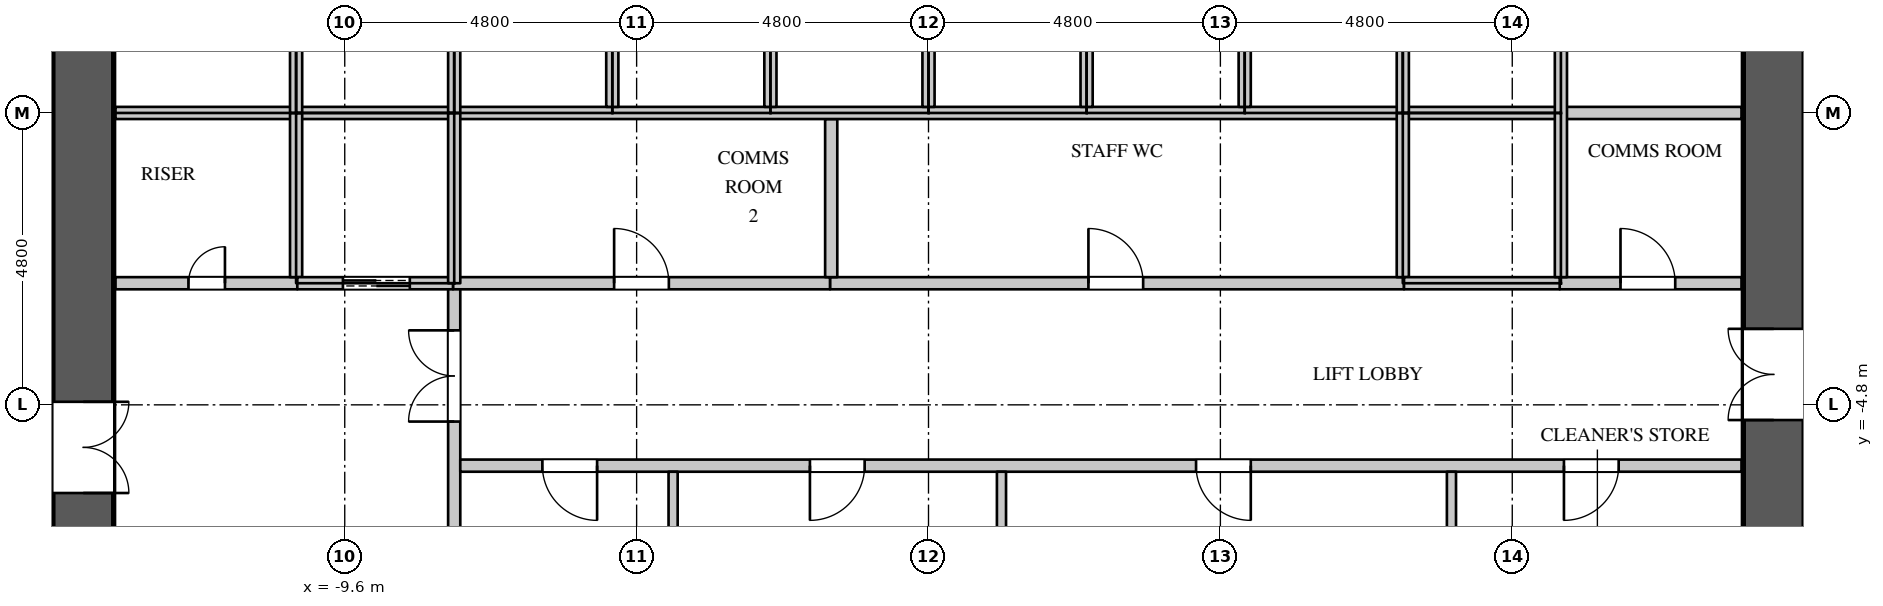
"""IFC4 building model, lengths in metres.
Left out: names, types, materials, properties, quantities, classifications, styles, units other than length and angle.
Written with IfcOpenShell. Run it as: python <this file> out.ifc"""

import sys

from ifc_helpers import new_model, si_unit, direction, frame, frame_2d, origin, place, context, subcontext, project, spatial, rectangle, extrude, element, fill, save


model = new_model("IFC4")
c1 = context("Model", 3, precision=1e-05, world=origin(), true_north=direction((0.0, 1.0)))
c2 = subcontext(c1, "Body", "Model", "MODEL_VIEW")
j1 = project(units=[si_unit("LENGTHUNIT", "METRE"), si_unit("PLANEANGLEUNIT", "RADIAN")], contexts=[c1])
p1 = place(None, origin())
s1 = spatial("IfcSite", under=j1, at=p1, CompositionType="ELEMENT")
p2 = place(p1, origin())
s2 = spatial("IfcBuilding", under=s1, at=p2, CompositionType="ELEMENT")
p3 = place(p2, frame((0.0, 0.0, 80.1)))
s3 = spatial("IfcBuildingStorey", under=s2, at=p3, CompositionType="ELEMENT", Elevation=80.1)
p4 = place(p3, frame((13.9, -11.0, 0.0), z_axis=(0.0, 0.0, 1.0), x_axis=(0.0, 1.0, 0.0)))
e1 = element("IfcWall", 1, at=p4, inside=s3, PredefinedType="SHEAR", context=c2, shape_type="SweptSolid", body=[
    extrude(rectangle(XDim=22.0, YDim=1.0, at=frame_2d((11.0, 0.0))), origin(), (0.0, 0.0, 1.0), 4.2),
])
p5 = place(p4, frame((20.05, 0.0, 0.0)))
e2 = element("IfcOpeningElement", 2, at=p5, cuts=e1, PredefinedType="OPENING", context=c2, shape_type="SweptSolid", body=[
    extrude(rectangle(XDim=1.1, YDim=2.2, at=frame_2d((0.55, 1.1))), frame((0.0, 0.51, 0.0), z_axis=(0.0, -1.0, 0.0), x_axis=(1.0, 0.0, 0.0)), (0.0, 0.0, 1.0), 1.02),
])
p6 = place(p4, frame((0.85, 0.0, 0.0)))
e3 = element("IfcOpeningElement", 3, at=p6, cuts=e1, PredefinedType="OPENING", context=c2, shape_type="SweptSolid", body=[
    extrude(rectangle(XDim=1.1, YDim=2.2, at=frame_2d((0.55, 1.1))), frame((0.0, 0.51, 0.0), z_axis=(0.0, -1.0, 0.0), x_axis=(1.0, 0.0, 0.0)), (0.0, 0.0, 1.0), 1.02),
])
p7 = place(p4, frame((14.55, 0.0, 0.0)))
e4 = element("IfcOpeningElement", 4, at=p7, cuts=e1, PredefinedType="OPENING", context=c2, shape_type="SweptSolid", body=[
    extrude(rectangle(XDim=1.5, YDim=2.4, at=frame_2d((0.75, 1.2))), frame((0.0, 0.51, 0.0), z_axis=(0.0, -1.0, 0.0), x_axis=(1.0, 0.0, 0.0)), (0.0, 0.0, 1.0), 1.02),
])
p8 = place(p4, frame((5.95, 0.0, 0.0)))
e5 = element("IfcOpeningElement", 5, at=p8, cuts=e1, PredefinedType="OPENING", context=c2, shape_type="SweptSolid", body=[
    extrude(rectangle(XDim=1.5, YDim=2.4, at=frame_2d((0.75, 1.2))), frame((0.0, 0.51, 0.0), z_axis=(0.0, -1.0, 0.0), x_axis=(1.0, 0.0, 0.0)), (0.0, 0.0, 1.0), 1.02),
])
p9 = place(p3, frame((-13.9, -11.0, 0.0), z_axis=(0.0, 0.0, 1.0), x_axis=(0.0, 1.0, 0.0)))
e6 = element("IfcWall", 6, at=p9, inside=s3, PredefinedType="SHEAR", context=c2, shape_type="SweptSolid", body=[
    extrude(rectangle(XDim=22.0, YDim=1.0, at=frame_2d((11.0, 0.0))), origin(), (0.0, 0.0, 1.0), 4.2),
])
p10 = place(p9, frame((20.05, 0.0, 0.0)))
e7 = element("IfcOpeningElement", 7, at=p10, cuts=e6, PredefinedType="OPENING", context=c2, shape_type="SweptSolid", body=[
    extrude(rectangle(XDim=1.1, YDim=2.2, at=frame_2d((0.55, 1.1))), frame((0.0, 0.51, 0.0), z_axis=(0.0, -1.0, 0.0), x_axis=(1.0, 0.0, 0.0)), (0.0, 0.0, 1.0), 1.02),
])
p11 = place(p9, frame((0.85, 0.0, 0.0)))
e8 = element("IfcOpeningElement", 8, at=p11, cuts=e6, PredefinedType="OPENING", context=c2, shape_type="SweptSolid", body=[
    extrude(rectangle(XDim=1.1, YDim=2.2, at=frame_2d((0.55, 1.1))), frame((0.0, 0.51, 0.0), z_axis=(0.0, -1.0, 0.0), x_axis=(1.0, 0.0, 0.0)), (0.0, 0.0, 1.0), 1.02),
])
p12 = place(p9, frame((15.75, 0.0, 0.0)))
e9 = element("IfcOpeningElement", 9, at=p12, cuts=e6, PredefinedType="OPENING", context=c2, shape_type="SweptSolid", body=[
    extrude(rectangle(XDim=1.5, YDim=2.4, at=frame_2d((0.75, 1.2))), frame((0.0, 0.51, 0.0), z_axis=(0.0, -1.0, 0.0), x_axis=(1.0, 0.0, 0.0)), (0.0, 0.0, 1.0), 1.02),
])
p13 = place(p9, frame((4.75, 0.0, 0.0)))
e10 = element("IfcOpeningElement", 10, at=p13, cuts=e6, PredefinedType="OPENING", context=c2, shape_type="SweptSolid", body=[
    extrude(rectangle(XDim=1.5, YDim=2.4, at=frame_2d((0.75, 1.2))), frame((0.0, 0.51, 0.0), z_axis=(0.0, -1.0, 0.0), x_axis=(1.0, 0.0, 0.0)), (0.0, 0.0, 1.0), 1.02),
])
p14 = place(p3, frame((-7.8, -8.075, 0.0), z_axis=(0.0, 0.0, 1.0), x_axis=(0.0, 1.0, 0.0)))
e11 = element("IfcWall", 11, at=p14, inside=s3, PredefinedType="PARTITIONING", context=c2, shape_type="SweptSolid", body=[
    extrude(rectangle(XDim=5.275, YDim=0.2, at=frame_2d((2.637, 0.0))), origin(), (0.0, 0.0, 1.0), 3.95),
])
p15 = place(p14, frame((3.0, 0.0, 0.0)))
e12 = element("IfcOpeningElement", 12, at=p15, cuts=e11, PredefinedType="OPENING", context=c2, shape_type="SweptSolid", body=[
    extrude(rectangle(XDim=1.5, YDim=2.4, at=frame_2d((0.75, 1.2))), frame((0.0, 0.11, 0.0), z_axis=(0.0, -1.0, 0.0), x_axis=(1.0, 0.0, 0.0)), (0.0, 0.0, 1.0), 0.22),
])
p16 = place(p3, frame((-7.7, -5.8, 0.0), z_axis=(0.0, 0.0, 1.0), x_axis=(1.0, 0.0, 0.0)))
e13 = element("IfcWall", 13, at=p16, inside=s3, PredefinedType="PARTITIONING", context=c2, shape_type="SweptSolid", body=[
    extrude(rectangle(XDim=21.07, YDim=0.2, at=frame_2d((10.535, 0.0))), origin(), (0.0, 0.0, 1.0), 3.95),
])
p17 = place(p16, frame((1.35, 0.0, 0.0)))
e14 = element("IfcOpeningElement", 14, at=p17, cuts=e13, PredefinedType="OPENING", context=c2, shape_type="SweptSolid", body=[
    extrude(rectangle(XDim=0.9, YDim=2.2, at=frame_2d((0.45, 1.1))), frame((0.0, 0.11, 0.0), z_axis=(0.0, -1.0, 0.0), x_axis=(1.0, 0.0, 0.0)), (0.0, 0.0, 1.0), 0.22),
])
p18 = place(p16, frame((5.75, 0.0, 0.0)))
e15 = element("IfcOpeningElement", 15, at=p18, cuts=e13, PredefinedType="OPENING", context=c2, shape_type="SweptSolid", body=[
    extrude(rectangle(XDim=0.9, YDim=2.2, at=frame_2d((0.45, 1.1))), frame((0.0, 0.11, 0.0), z_axis=(0.0, -1.0, 0.0), x_axis=(1.0, 0.0, 0.0)), (0.0, 0.0, 1.0), 0.22),
])
p19 = place(p16, frame((12.1, 0.0, 0.0)))
e16 = element("IfcOpeningElement", 16, at=p19, cuts=e13, PredefinedType="OPENING", context=c2, shape_type="SweptSolid", body=[
    extrude(rectangle(XDim=0.9, YDim=2.2, at=frame_2d((0.45, 1.1))), frame((0.0, 0.11, 0.0), z_axis=(0.0, -1.0, 0.0), x_axis=(1.0, 0.0, 0.0)), (0.0, 0.0, 1.0), 0.22),
])
p20 = place(p16, frame((18.15, 0.0, 0.0)))
e17 = element("IfcOpeningElement", 17, at=p20, cuts=e13, PredefinedType="OPENING", context=c2, shape_type="SweptSolid", body=[
    extrude(rectangle(XDim=0.9, YDim=2.2, at=frame_2d((0.45, 1.1))), frame((0.0, 0.11, 0.0), z_axis=(0.0, -1.0, 0.0), x_axis=(1.0, 0.0, 0.0)), (0.0, 0.0, 1.0), 0.22),
])
p21 = place(p3, frame((-1.62, -2.8, 0.0), z_axis=(0.0, 0.0, 1.0), x_axis=(1.0, 0.0, 0.0)))
e18 = element("IfcWall", 18, at=p21, inside=s3, PredefinedType="PARTITIONING", context=c2, shape_type="SweptSolid", body=[
    extrude(rectangle(XDim=9.44, YDim=0.2, at=frame_2d((4.72, 0.0))), origin(), (0.0, 0.0, 1.0), 3.95),
])
p22 = place(p21, frame((4.25, 0.0, 0.0)))
e19 = element("IfcOpeningElement", 19, at=p22, cuts=e18, PredefinedType="OPENING", context=c2, shape_type="SweptSolid", body=[
    extrude(rectangle(XDim=0.9, YDim=2.2, at=frame_2d((0.45, 1.1))), frame((0.0, 0.11, 0.0), z_axis=(0.0, -1.0, 0.0), x_axis=(1.0, 0.0, 0.0)), (0.0, 0.0, 1.0), 0.22),
])
for number, where, z_axis, x_axis in (
    (20, (-4.2, -10.97, 0.0), (0.0, 0.0, 1.0), (0.0, 1.0, 0.0)),
    (21, (1.2, -10.97, 0.0), (0.0, 0.0, 1.0), (0.0, 1.0, 0.0)),
):
    element("IfcWall", number, at=place(p3, frame(where, z_axis=z_axis, x_axis=x_axis)), inside=s3, PredefinedType="PARTITIONING", context=c2, shape_type="SweptSolid", body=[
        extrude(rectangle(XDim=5.07, YDim=0.15, at=frame_2d((2.535, 0.0))), origin(), (0.0, 0.0, 1.0), 3.95),
    ])
p23 = place(p3, frame((8.6, -8.075, 0.0), z_axis=(0.0, 0.0, 1.0), x_axis=(0.0, 1.0, 0.0)))
e22 = element("IfcWall", 22, at=p23, inside=s3, PredefinedType="PARTITIONING", context=c2, shape_type="SweptSolid", body=[
    extrude(rectangle(XDim=2.175, YDim=0.15, at=frame_2d((1.087, 0.0))), origin(), (0.0, 0.0, 1.0), 3.95),
])
p24 = place(p3, frame((-13.37, -2.8, 0.0), z_axis=(0.0, 0.0, 1.0), x_axis=(1.0, 0.0, 0.0)))
e23 = element("IfcWall", 23, at=p24, inside=s3, PredefinedType="PARTITIONING", context=c2, shape_type="SweptSolid", body=[
    extrude(rectangle(XDim=2.99, YDim=0.2, at=frame_2d((1.495, 0.0))), origin(), (0.0, 0.0, 1.0), 3.95),
])
p25 = place(p24, frame((1.2, 0.0, 0.0)))
e24 = element("IfcOpeningElement", 24, at=p25, cuts=e23, PredefinedType="OPENING", context=c2, shape_type="SweptSolid", body=[
    extrude(rectangle(XDim=0.6, YDim=2.0, at=frame_2d((0.3, 1.0))), frame((0.0, 0.11, 0.0), z_axis=(0.0, -1.0, 0.0), x_axis=(1.0, 0.0, 0.0)), (0.0, 0.0, 1.0), 0.22),
])
p26 = place(p3, frame((-7.82, -2.8, 0.0), z_axis=(0.0, 0.0, 1.0), x_axis=(1.0, 0.0, 0.0)))
e25 = element("IfcWall", 25, at=p26, inside=s3, PredefinedType="PARTITIONING", context=c2, shape_type="SweptSolid", body=[
    extrude(rectangle(XDim=6.2, YDim=0.2, at=frame_2d((3.1, 0.0))), origin(), (0.0, 0.0, 1.0), 3.95),
])
p27 = place(p26, frame((2.65, 0.0, 0.0)))
e26 = element("IfcOpeningElement", 26, at=p27, cuts=e25, PredefinedType="OPENING", context=c2, shape_type="SweptSolid", body=[
    extrude(rectangle(XDim=0.9, YDim=2.2, at=frame_2d((0.45, 1.1))), frame((0.0, 0.11, 0.0), z_axis=(0.0, -1.0, 0.0), x_axis=(1.0, 0.0, 0.0)), (0.0, 0.0, 1.0), 0.22),
])
p28 = place(p3, frame((-1.6, -2.7, 0.0), z_axis=(0.0, 0.0, 1.0), x_axis=(0.0, 1.0, 0.0)))
e27 = element("IfcWall", 27, at=p28, inside=s3, PredefinedType="PARTITIONING", context=c2, shape_type="SweptSolid", body=[
    extrude(rectangle(XDim=2.6, YDim=0.2, at=frame_2d((1.3, 0.0))), origin(), (0.0, 0.0, 1.0), 3.95),
])
p29 = place(p3, frame((10.38, -2.8, 0.0), z_axis=(0.0, 0.0, 1.0), x_axis=(1.0, 0.0, 0.0)))
e28 = element("IfcWall", 28, at=p29, inside=s3, PredefinedType="PARTITIONING", context=c2, shape_type="SweptSolid", body=[
    extrude(rectangle(XDim=2.99, YDim=0.2, at=frame_2d((1.495, 0.0))), origin(), (0.0, 0.0, 1.0), 3.95),
])
p30 = place(p29, frame((1.0, 0.0, 0.0)))
e29 = element("IfcOpeningElement", 29, at=p30, cuts=e28, PredefinedType="OPENING", context=c2, shape_type="SweptSolid", body=[
    extrude(rectangle(XDim=0.9, YDim=2.2, at=frame_2d((0.45, 1.1))), frame((0.0, 0.11, 0.0), z_axis=(0.0, -1.0, 0.0), x_axis=(1.0, 0.0, 0.0)), (0.0, 0.0, 1.0), 0.22),
])
p31 = place(p3, frame((10.4, 0.0, 0.0), z_axis=(0.0, 0.0, 1.0), x_axis=(1.0, 0.0, 0.0)))
e30 = element("IfcWall", 30, at=p31, inside=s3, PredefinedType="PARTITIONING", context=c2, shape_type="SweptSolid", body=[
    extrude(rectangle(XDim=2.97, YDim=0.2, at=frame_2d((1.485, 0.0))), origin(), (0.0, 0.0, 1.0), 3.95),
])
p32 = place(p3, frame((-13.37, 0.0, 0.0), z_axis=(0.0, 0.0, 1.0), x_axis=(1.0, 0.0, 0.0)))
e31 = element("IfcWall", 31, at=p32, inside=s3, PredefinedType="PARTITIONING", context=c2, shape_type="SweptSolid", body=[
    extrude(rectangle(XDim=23.77, YDim=0.2, at=frame_2d((11.885, 0.0))), origin(), (0.0, 0.0, 1.0), 3.95),
])
p33 = place(p3, frame((-10.4, -2.7, 0.0), z_axis=(0.0, 0.0, 1.0), x_axis=(0.0, 1.0, 0.0)))
e32 = element("IfcWall", 32, at=p33, inside=s3, PredefinedType="PARTITIONING", context=c2, shape_type="SweptSolid", body=[
    extrude(rectangle(XDim=2.7, YDim=0.2, at=frame_2d((1.35, 0.0))), origin(), (0.0, 0.0, 1.0), 3.95),
])
p34 = place(p3, frame((-10.38, -2.8, 0.0), z_axis=(0.0, 0.0, 1.0), x_axis=(1.0, 0.0, 0.0)))
e33 = element("IfcWall", 33, at=p34, inside=s3, PredefinedType="PARTITIONING", context=c2, shape_type="SweptSolid", body=[
    extrude(rectangle(XDim=2.56, YDim=0.2, at=frame_2d((1.28, 0.0))), origin(), (0.0, 0.0, 1.0), 3.95),
])
p35 = place(p34, frame((0.75, 0.0, 0.0)))
e34 = element("IfcOpeningElement", 34, at=p35, cuts=e33, PredefinedType="OPENING", context=c2, shape_type="SweptSolid", body=[
    extrude(rectangle(XDim=1.1, YDim=2.2, at=frame_2d((0.55, 1.1))), frame((0.0, 0.11, 0.0), z_axis=(0.0, -1.0, 0.0), x_axis=(1.0, 0.0, 0.0)), (0.0, 0.0, 1.0), 0.22),
])
p36 = place(p3, frame((-10.4, 0.0, 0.0), z_axis=(0.0, 0.0, 1.0), x_axis=(0.0, 1.0, 0.0)))
e35 = element("IfcWall", 35, at=p36, inside=s3, PredefinedType="PARTITIONING", context=c2, shape_type="SweptSolid", body=[
    extrude(rectangle(XDim=2.7, YDim=0.2, at=frame_2d((1.35, 0.0))), origin(), (0.0, 0.0, 1.0), 3.95),
])
for number, where, z_axis, x_axis in (
    (36, (-7.8, -2.8, 0.0), (0.0, 0.0, 1.0), (0.0, 1.0, 0.0)),
    (37, (-7.8, 0.0, 0.0), (0.0, 0.0, 1.0), (0.0, 1.0, 0.0)),
):
    element("IfcWall", number, at=place(p3, frame(where, z_axis=z_axis, x_axis=x_axis)), inside=s3, PredefinedType="PARTITIONING", context=c2, shape_type="SweptSolid", body=[
        extrude(rectangle(XDim=2.8, YDim=0.2, at=frame_2d((1.4, 0.0))), origin(), (0.0, 0.0, 1.0), 3.95),
    ])
for number, where, z_axis, x_axis in (
    (38, (-5.2, 0.1, 0.0), (0.0, 0.0, 1.0), (0.0, 1.0, 0.0)),
    (39, (-2.6, 0.1, 0.0), (0.0, 0.0, 1.0), (0.0, 1.0, 0.0)),
    (40, (0.0, 0.1, 0.0), (0.0, 0.0, 1.0), (0.0, 1.0, 0.0)),
    (41, (2.6, 0.1, 0.0), (0.0, 0.0, 1.0), (0.0, 1.0, 0.0)),
    (42, (5.2, 0.1, 0.0), (0.0, 0.0, 1.0), (0.0, 1.0, 0.0)),
):
    element("IfcWall", number, at=place(p3, frame(where, z_axis=z_axis, x_axis=x_axis)), inside=s3, PredefinedType="PARTITIONING", context=c2, shape_type="SweptSolid", body=[
        extrude(rectangle(XDim=2.6, YDim=0.2, at=frame_2d((1.3, 0.0))), origin(), (0.0, 0.0, 1.0), 3.95),
    ])
p37 = place(p3, frame((7.8, -2.7, 0.0), z_axis=(0.0, 0.0, 1.0), x_axis=(0.0, 1.0, 0.0)))
e43 = element("IfcWall", 43, at=p37, inside=s3, PredefinedType="PARTITIONING", context=c2, shape_type="SweptSolid", body=[
    extrude(rectangle(XDim=2.7, YDim=0.2, at=frame_2d((1.35, 0.0))), origin(), (0.0, 0.0, 1.0), 3.95),
])
p38 = place(p3, frame((7.82, -2.8, 0.0), z_axis=(0.0, 0.0, 1.0), x_axis=(1.0, 0.0, 0.0)))
e44 = element("IfcWall", 44, at=p38, inside=s3, PredefinedType="PARTITIONING", context=c2, shape_type="SweptSolid", body=[
    extrude(rectangle(XDim=2.56, YDim=0.2, at=frame_2d((1.28, 0.0))), origin(), (0.0, 0.0, 1.0), 3.95),
])
p39 = place(p3, frame((7.8, 0.0, 0.0), z_axis=(0.0, 0.0, 1.0), x_axis=(0.0, 1.0, 0.0)))
e45 = element("IfcWall", 45, at=p39, inside=s3, PredefinedType="PARTITIONING", context=c2, shape_type="SweptSolid", body=[
    extrude(rectangle(XDim=2.7, YDim=0.2, at=frame_2d((1.35, 0.0))), origin(), (0.0, 0.0, 1.0), 3.95),
])
p40 = place(p3, frame((10.4, -2.7, 0.0), z_axis=(0.0, 0.0, 1.0), x_axis=(0.0, 1.0, 0.0)))
e46 = element("IfcWall", 46, at=p40, inside=s3, PredefinedType="PARTITIONING", context=c2, shape_type="SweptSolid", body=[
    extrude(rectangle(XDim=5.4, YDim=0.2, at=frame_2d((2.7, 0.0))), origin(), (0.0, 0.0, 1.0), 3.95),
])
p41 = place(p25, origin())
e47 = element("IfcDoor", 47, at=p41, inside=s3, OperationType="SINGLE_SWING_RIGHT", PredefinedType="DOOR", context=c2, shape_type="SweptSolid", body=[
    extrude(rectangle(XDim=0.6, YDim=2.0, at=frame_2d((0.3, 1.0))), frame((0.0, 0.025, 0.0), z_axis=(0.0, -1.0, 0.0), x_axis=(1.0, 0.0, 0.0)), (0.0, 0.0, 1.0), 0.05),
])
fill(e24, e47)
p42 = place(p30, origin())
e48 = element("IfcDoor", 48, at=p42, inside=s3, OperationType="SINGLE_SWING_LEFT", PredefinedType="DOOR", context=c2, shape_type="SweptSolid", body=[
    extrude(rectangle(XDim=0.9, YDim=2.2, at=frame_2d((0.45, 1.1))), frame((0.0, 0.025, 0.0), z_axis=(0.0, -1.0, 0.0), x_axis=(1.0, 0.0, 0.0)), (0.0, 0.0, 1.0), 0.05),
])
fill(e29, e48)
p43 = place(p17, origin())
e49 = element("IfcDoor", 49, at=p43, inside=s3, OperationType="SINGLE_SWING_LEFT", PredefinedType="DOOR", context=c2, shape_type="SweptSolid", body=[
    extrude(rectangle(XDim=0.9, YDim=2.2, at=frame_2d((0.45, 1.1))), frame((0.0, 0.025, 0.0), z_axis=(0.0, -1.0, 0.0), x_axis=(1.0, 0.0, 0.0)), (0.0, 0.0, 1.0), 0.05),
])
fill(e14, e49)
p44 = place(p18, origin())
e50 = element("IfcDoor", 50, at=p44, inside=s3, OperationType="SINGLE_SWING_RIGHT", PredefinedType="DOOR", context=c2, shape_type="SweptSolid", body=[
    extrude(rectangle(XDim=0.9, YDim=2.2, at=frame_2d((0.45, 1.1))), frame((0.0, 0.025, 0.0), z_axis=(0.0, -1.0, 0.0), x_axis=(1.0, 0.0, 0.0)), (0.0, 0.0, 1.0), 0.05),
])
fill(e15, e50)
p45 = place(p19, origin())
e51 = element("IfcDoor", 51, at=p45, inside=s3, OperationType="SINGLE_SWING_LEFT", PredefinedType="DOOR", context=c2, shape_type="SweptSolid", body=[
    extrude(rectangle(XDim=0.9, YDim=2.2, at=frame_2d((0.45, 1.1))), frame((0.0, 0.025, 0.0), z_axis=(0.0, -1.0, 0.0), x_axis=(1.0, 0.0, 0.0)), (0.0, 0.0, 1.0), 0.05),
])
fill(e16, e51)
p46 = place(p20, origin())
e52 = element("IfcDoor", 52, at=p46, inside=s3, OperationType="SINGLE_SWING_RIGHT", PredefinedType="DOOR", context=c2, shape_type="SweptSolid", body=[
    extrude(rectangle(XDim=0.9, YDim=2.2, at=frame_2d((0.45, 1.1))), frame((0.0, 0.025, 0.0), z_axis=(0.0, -1.0, 0.0), x_axis=(1.0, 0.0, 0.0)), (0.0, 0.0, 1.0), 0.05),
])
fill(e17, e52)
p47 = place(p27, origin())
e53 = element("IfcDoor", 53, at=p47, inside=s3, OperationType="SINGLE_SWING_LEFT", PredefinedType="DOOR", context=c2, shape_type="SweptSolid", body=[
    extrude(rectangle(XDim=0.9, YDim=2.2, at=frame_2d((0.45, 1.1))), frame((0.0, 0.025, 0.0), z_axis=(0.0, -1.0, 0.0), x_axis=(1.0, 0.0, 0.0)), (0.0, 0.0, 1.0), 0.05),
])
fill(e26, e53)
p48 = place(p22, origin())
e54 = element("IfcDoor", 54, at=p48, inside=s3, OperationType="SINGLE_SWING_LEFT", PredefinedType="DOOR", context=c2, shape_type="SweptSolid", body=[
    extrude(rectangle(XDim=0.9, YDim=2.2, at=frame_2d((0.45, 1.1))), frame((0.0, 0.025, 0.0), z_axis=(0.0, -1.0, 0.0), x_axis=(1.0, 0.0, 0.0)), (0.0, 0.0, 1.0), 0.05),
])
fill(e19, e54)
p49 = place(p35, origin())
e55 = element("IfcDoor", 55, at=p49, inside=s3, OperationType="DOUBLE_DOOR_SLIDING", PredefinedType="DOOR", context=c2, shape_type="SweptSolid", body=[
    extrude(rectangle(XDim=1.1, YDim=2.2, at=frame_2d((0.55, 1.1))), frame((0.0, 0.025, 0.0), z_axis=(0.0, -1.0, 0.0), x_axis=(1.0, 0.0, 0.0)), (0.0, 0.0, 1.0), 0.05),
])
fill(e34, e55)
p50 = place(p15, origin())
e56 = element("IfcDoor", 56, at=p50, inside=s3, OperationType="DOUBLE_DOOR_SINGLE_SWING", PredefinedType="DOOR", context=c2, shape_type="SweptSolid", body=[
    extrude(rectangle(XDim=1.5, YDim=2.4, at=frame_2d((0.75, 1.2))), frame((0.0, 0.025, 0.0), z_axis=(0.0, -1.0, 0.0), x_axis=(1.0, 0.0, 0.0)), (0.0, 0.0, 1.0), 0.05),
])
fill(e12, e56)
p51 = place(p13, origin())
e57 = element("IfcDoor", 57, at=p51, inside=s3, OperationType="DOUBLE_DOOR_SINGLE_SWING", PredefinedType="DOOR", context=c2, shape_type="SweptSolid", body=[
    extrude(rectangle(XDim=1.5, YDim=2.4, at=frame_2d((0.75, 1.2))), frame((0.0, -0.445, 0.0), z_axis=(0.0, -1.0, 0.0), x_axis=(1.0, 0.0, 0.0)), (0.0, 0.0, 1.0), 0.05),
])
fill(e10, e57)
p52 = place(p8, origin())
e58 = element("IfcDoor", 58, at=p52, inside=s3, OperationType="DOUBLE_DOOR_SINGLE_SWING", PredefinedType="DOOR", context=c2, shape_type="SweptSolid", body=[
    extrude(rectangle(XDim=1.5, YDim=2.4, at=frame_2d((0.75, 1.2))), frame((0.0, 0.495, 0.0), z_axis=(0.0, -1.0, 0.0), x_axis=(1.0, 0.0, 0.0)), (0.0, 0.0, 1.0), 0.05),
])
fill(e5, e58)
save(model, sys.argv[1])
